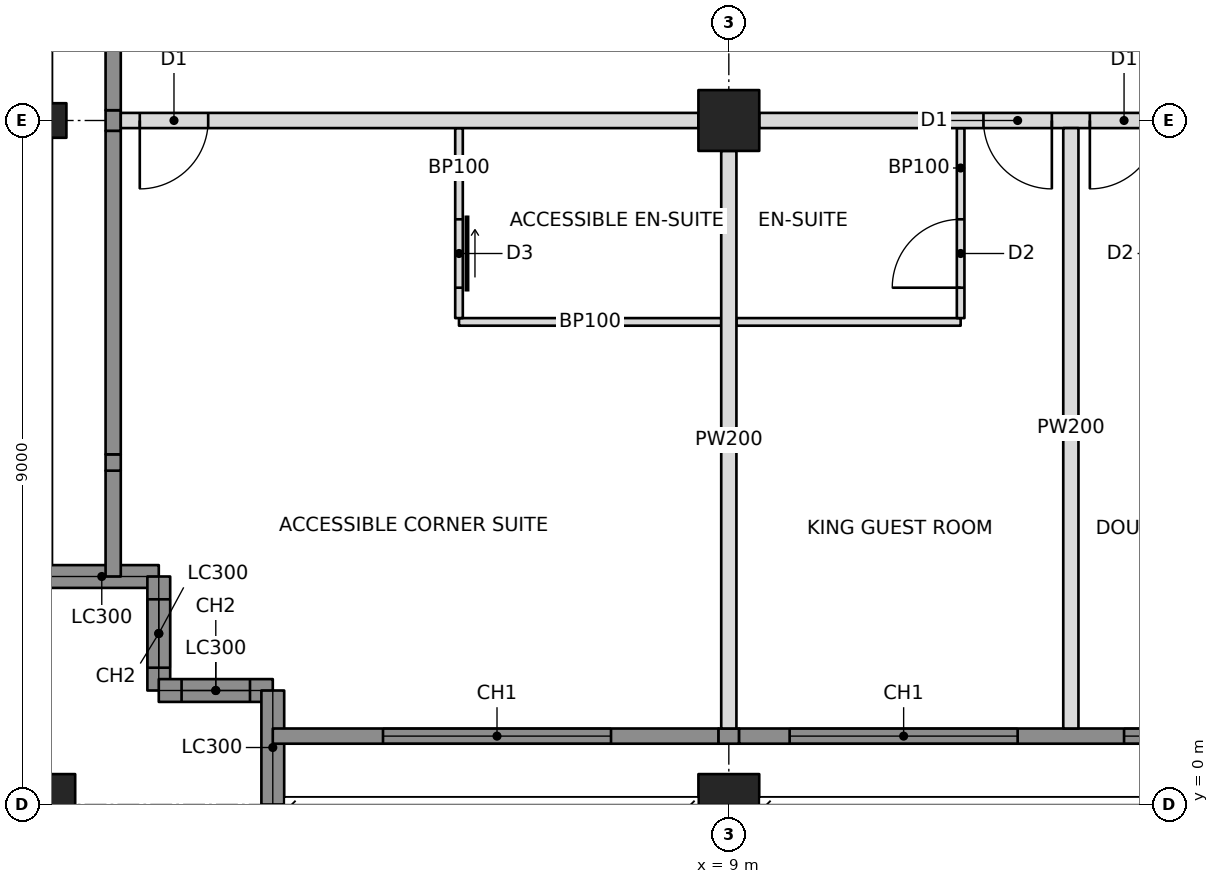
"""IFC4 building model, lengths in metres.
Left out: names, types, materials, properties, quantities, classifications, styles, units other than length and angle.
Written with IfcOpenShell. Run it as: python <this file> out.ifc"""

import sys

from ifc_helpers import new_model, si_unit, direction, frame, frame_2d, origin, origin_with_axes, origin_2d, place, context, subcontext, project, spatial, rectangle, hollow_rectangle, i_section, extrude, element, fill, save


model = new_model("IFC4")
c1 = context("Model", 3, precision=1e-05, world=origin(), true_north=direction((0.0, 1.0)))
c2 = subcontext(c1, "Body", "Model", "MODEL_VIEW")
j1 = project(units=[si_unit("LENGTHUNIT", "METRE"), si_unit("PLANEANGLEUNIT", "RADIAN")], contexts=[c1])
p1 = place(None, origin())
s1 = spatial("IfcSite", under=j1, at=p1, CompositionType="ELEMENT")
p2 = place(p1, origin())
s2 = spatial("IfcBuilding", under=s1, at=p2, CompositionType="ELEMENT")
p3 = place(p2, frame((0.0, 0.0, 82.4)))
s3 = spatial("IfcBuildingStorey", under=s2, at=p3, CompositionType="ELEMENT", Elevation=82.4)
p4 = place(p3, origin_with_axes())
e1 = element("IfcColumn", 1, at=p4, inside=s3, PredefinedType="COLUMN", context=c2, shape_type="SweptSolid", body=[
    extrude(hollow_rectangle(XDim=0.8, YDim=0.8, WallThickness=0.07, at=origin_2d()), origin(), (0.0, 0.0, 1.0), 3.4),
])
p5 = place(p3, frame((0.0, 9.0, 0.0), z_axis=(0.0, 0.0, 1.0), x_axis=(0.0, 1.0, 0.0)))
e2 = element("IfcColumn", 2, at=p5, inside=s3, PredefinedType="COLUMN", context=c2, shape_type="SweptSolid", body=[
    extrude(i_section(OverallWidth=0.455, OverallDepth=0.569, WebThickness=0.078, FlangeThickness=0.125, at=origin_2d()), origin(), (0.0, 0.0, 1.0), 3.4),
])
p6 = place(p3, frame((9.0, 0.0, 0.0), z_axis=(0.0, 0.0, 1.0), x_axis=(1.0, 0.0, 0.0)))
e3 = element("IfcColumn", 3, at=p6, inside=s3, PredefinedType="COLUMN", context=c2, shape_type="SweptSolid", body=[
    extrude(hollow_rectangle(XDim=0.8, YDim=0.8, WallThickness=0.07, at=origin_2d()), origin(), (0.0, 0.0, 1.0), 3.4),
])
p7 = place(p3, frame((9.0, 9.0, 0.0), z_axis=(0.0, 0.0, 1.0), x_axis=(1.0, 0.0, 0.0)))
e4 = element("IfcColumn", 4, at=p7, inside=s3, PredefinedType="COLUMN", context=c2, shape_type="SweptSolid", body=[
    extrude(hollow_rectangle(XDim=0.8, YDim=0.8, WallThickness=0.09, at=origin_2d()), origin(), (0.0, 0.0, 1.0), 3.4),
])
p8 = place(p3, frame((0.0, 3.0, 0.0), z_axis=(0.0, 0.0, 1.0), x_axis=(1.0, 0.0, 0.0)))
e5 = element("IfcWall", 5, at=p8, inside=s3, PredefinedType="SOLIDWALL", context=c2, shape_type="SweptSolid", body=[
    extrude(rectangle(XDim=1.5, YDim=0.3, at=frame_2d((0.75, 0.0))), origin(), (0.0, 0.0, 1.0), 2.42),
])
p9 = place(p3, frame((1.5, 3.0, 0.0), z_axis=(0.0, 0.0, 1.0), x_axis=(0.0, -1.0, 0.0)))
e6 = element("IfcWall", 6, at=p9, inside=s3, PredefinedType="SOLIDWALL", context=c2, shape_type="SweptSolid", body=[
    extrude(rectangle(XDim=1.5, YDim=0.3, at=frame_2d((0.75, 0.0))), origin(), (0.0, 0.0, 1.0), 3.2),
])
p10 = place(p9, frame((0.3, 0.0, 0.6)))
e7 = element("IfcOpeningElement", 7, at=p10, cuts=e6, PredefinedType="OPENING", context=c2, shape_type="SweptSolid", body=[
    extrude(rectangle(XDim=0.9, YDim=2.2, at=frame_2d((0.45, 1.1))), frame((0.0, 0.16, 0.0), z_axis=(0.0, -1.0, 0.0), x_axis=(1.0, 0.0, 0.0)), (0.0, 0.0, 1.0), 0.32),
])
p11 = place(p3, frame((1.5, 1.5, 0.0), z_axis=(0.0, 0.0, 1.0), x_axis=(1.0, 0.0, 0.0)))
e8 = element("IfcWall", 8, at=p11, inside=s3, PredefinedType="SOLIDWALL", context=c2, shape_type="SweptSolid", body=[
    extrude(rectangle(XDim=1.5, YDim=0.3, at=frame_2d((0.75, 0.0))), origin(), (0.0, 0.0, 1.0), 3.2),
])
p12 = place(p11, frame((0.3, 0.0, 0.6)))
e9 = element("IfcOpeningElement", 9, at=p12, cuts=e8, PredefinedType="OPENING", context=c2, shape_type="SweptSolid", body=[
    extrude(rectangle(XDim=0.9, YDim=2.2, at=frame_2d((0.45, 1.1))), frame((0.0, 0.16, 0.0), z_axis=(0.0, -1.0, 0.0), x_axis=(1.0, 0.0, 0.0)), (0.0, 0.0, 1.0), 0.32),
])
p13 = place(p3, frame((3.0, 1.5, 0.0), z_axis=(0.0, 0.0, 1.0), x_axis=(0.0, -1.0, 0.0)))
e10 = element("IfcWall", 10, at=p13, inside=s3, PredefinedType="SOLIDWALL", context=c2, shape_type="SweptSolid", body=[
    extrude(rectangle(XDim=1.5, YDim=0.3, at=frame_2d((0.75, 0.0))), origin(), (0.0, 0.0, 1.0), 2.42),
])
p14 = place(p3, frame((3.0, 0.9, 0.0), z_axis=(0.0, 0.0, 1.0), x_axis=(1.0, 0.0, 0.0)))
e11 = element("IfcWall", 11, at=p14, inside=s3, PredefinedType="SOLIDWALL", context=c2, shape_type="SweptSolid", body=[
    extrude(rectangle(XDim=5.865, YDim=0.2, at=frame_2d((2.932, 0.0))), origin(), (0.0, 0.0, 1.0), 3.2),
])
p15 = place(p14, frame((1.45, 0.0, 0.6)))
e12 = element("IfcOpeningElement", 12, at=p15, cuts=e11, PredefinedType="OPENING", context=c2, shape_type="SweptSolid", body=[
    extrude(rectangle(XDim=3.0, YDim=2.2, at=frame_2d((1.5, 1.1))), frame((0.0, 0.11, 0.0), z_axis=(0.0, -1.0, 0.0), x_axis=(1.0, 0.0, 0.0)), (0.0, 0.0, 1.0), 0.22),
])
p16 = place(p3, frame((0.9, 3.0, 0.0), z_axis=(0.0, 0.0, 1.0), x_axis=(0.0, 1.0, 0.0)))
e13 = element("IfcWall", 13, at=p16, inside=s3, PredefinedType="SOLIDWALL", context=c2, shape_type="SweptSolid", body=[
    extrude(rectangle(XDim=1.393, YDim=0.2, at=frame_2d((0.696, 0.0))), origin(), (0.0, 0.0, 1.0), 3.2),
])
p17 = place(p3, frame((1.0, 9.0, 0.0), z_axis=(0.0, 0.0, 1.0), x_axis=(1.0, 0.0, 0.0)))
e14 = element("IfcWall", 14, at=p17, inside=s3, PredefinedType="PARTITIONING", context=c2, shape_type="SweptSolid", body=[
    extrude(rectangle(XDim=7.6, YDim=0.2, at=frame_2d((3.8, 0.0))), origin(), (0.0, 0.0, 1.0), 2.438),
])
p18 = place(p17, frame((0.25, 0.0, 0.0)))
e15 = element("IfcOpeningElement", 15, at=p18, cuts=e14, PredefinedType="OPENING", context=c2, shape_type="SweptSolid", body=[
    extrude(rectangle(XDim=0.9, YDim=2.1, at=frame_2d((0.45, 1.05))), frame((0.0, 0.11, 0.0), z_axis=(0.0, -1.0, 0.0), x_axis=(1.0, 0.0, 0.0)), (0.0, 0.0, 1.0), 0.22),
])
p19 = place(p3, frame((9.4, 9.0, 0.0), z_axis=(0.0, 0.0, 1.0), x_axis=(1.0, 0.0, 0.0)))
e16 = element("IfcWall", 16, at=p19, inside=s3, PredefinedType="PARTITIONING", context=c2, shape_type="SweptSolid", body=[
    extrude(rectangle(XDim=8.2, YDim=0.2, at=frame_2d((4.1, 0.0))), origin(), (0.0, 0.0, 1.0), 2.405),
])
p20 = place(p19, frame((2.95, 0.0, 0.0)))
e17 = element("IfcOpeningElement", 17, at=p20, cuts=e16, PredefinedType="OPENING", context=c2, shape_type="SweptSolid", body=[
    extrude(rectangle(XDim=0.9, YDim=2.1, at=frame_2d((0.45, 1.05))), frame((0.0, 0.11, 0.0), z_axis=(0.0, -1.0, 0.0), x_axis=(1.0, 0.0, 0.0)), (0.0, 0.0, 1.0), 0.22),
])
p21 = place(p19, frame((4.35, 0.0, 0.0)))
e18 = element("IfcOpeningElement", 18, at=p21, cuts=e16, PredefinedType="OPENING", context=c2, shape_type="SweptSolid", body=[
    extrude(rectangle(XDim=0.9, YDim=2.1, at=frame_2d((0.45, 1.05))), frame((0.0, 0.11, 0.0), z_axis=(0.0, -1.0, 0.0), x_axis=(1.0, 0.0, 0.0)), (0.0, 0.0, 1.0), 0.22),
])
p22 = place(p3, frame((9.0, 8.6, 0.0), z_axis=(0.0, 0.0, 1.0), x_axis=(0.0, -1.0, 0.0)))
e19 = element("IfcWall", 19, at=p22, inside=s3, PredefinedType="PARTITIONING", context=c2, shape_type="SweptSolid", body=[
    extrude(rectangle(XDim=7.6, YDim=0.2, at=frame_2d((3.8, 0.0))), origin(), (0.0, 0.0, 1.0), 2.438),
])
p23 = place(p3, frame((13.5, 8.9, 0.0), z_axis=(0.0, 0.0, 1.0), x_axis=(0.0, -1.0, 0.0)))
e20 = element("IfcWall", 20, at=p23, inside=s3, PredefinedType="PARTITIONING", context=c2, shape_type="SweptSolid", body=[
    extrude(rectangle(XDim=7.9, YDim=0.2, at=frame_2d((3.95, 0.0))), origin(), (0.0, 0.0, 1.0), 2.404),
])
p24 = place(p3, frame((5.45, 6.35, 0.0), z_axis=(0.0, 0.0, 1.0), x_axis=(1.0, 0.0, 0.0)))
e21 = element("IfcWall", 21, at=p24, inside=s3, PredefinedType="PARTITIONING", context=c2, shape_type="SweptSolid", body=[
    extrude(rectangle(XDim=3.45, YDim=0.1, at=frame_2d((1.725, 0.0))), origin(), (0.0, 0.0, 1.0), 2.438),
])
p25 = place(p3, frame((5.45, 8.9, 0.0), z_axis=(0.0, 0.0, 1.0), x_axis=(0.0, -1.0, 0.0)))
e22 = element("IfcWall", 22, at=p25, inside=s3, PredefinedType="PARTITIONING", context=c2, shape_type="SweptSolid", body=[
    extrude(rectangle(XDim=2.5, YDim=0.1, at=frame_2d((1.25, 0.0))), origin(), (0.0, 0.0, 1.0), 2.438),
])
p26 = place(p25, frame((1.2, 0.0, 0.0)))
e23 = element("IfcOpeningElement", 23, at=p26, cuts=e22, PredefinedType="OPENING", context=c2, shape_type="SweptSolid", body=[
    extrude(rectangle(XDim=0.9, YDim=2.1, at=frame_2d((0.45, 1.05))), frame((0.0, 0.06, 0.0), z_axis=(0.0, -1.0, 0.0), x_axis=(1.0, 0.0, 0.0)), (0.0, 0.0, 1.0), 0.12),
])
p27 = place(p3, frame((9.1, 6.35, 0.0), z_axis=(0.0, 0.0, 1.0), x_axis=(1.0, 0.0, 0.0)))
e24 = element("IfcWall", 24, at=p27, inside=s3, PredefinedType="PARTITIONING", context=c2, shape_type="SweptSolid", body=[
    extrude(rectangle(XDim=2.95, YDim=0.1, at=frame_2d((1.475, 0.0))), origin(), (0.0, 0.0, 1.0), 2.438),
])
p28 = place(p3, frame((12.05, 8.9, 0.0), z_axis=(0.0, 0.0, 1.0), x_axis=(0.0, -1.0, 0.0)))
e25 = element("IfcWall", 25, at=p28, inside=s3, PredefinedType="PARTITIONING", context=c2, shape_type="SweptSolid", body=[
    extrude(rectangle(XDim=2.5, YDim=0.1, at=frame_2d((1.25, 0.0))), origin(), (0.0, 0.0, 1.0), 2.404),
])
p29 = place(p28, frame((1.2, 0.0, 0.0)))
e26 = element("IfcOpeningElement", 26, at=p29, cuts=e25, PredefinedType="OPENING", context=c2, shape_type="SweptSolid", body=[
    extrude(rectangle(XDim=0.9, YDim=2.1, at=frame_2d((0.45, 1.05))), frame((0.0, 0.06, 0.0), z_axis=(0.0, -1.0, 0.0), x_axis=(1.0, 0.0, 0.0)), (0.0, 0.0, 1.0), 0.12),
])
p30 = place(p3, frame((8.865, 0.9, 0.0), z_axis=(0.0, 0.0, 1.0), x_axis=(1.0, 0.0, 0.0)))
e27 = element("IfcWall", 27, at=p30, inside=s3, PredefinedType="SOLIDWALL", context=c2, shape_type="SweptSolid", body=[
    extrude(rectangle(XDim=0.271, YDim=0.2, at=frame_2d((0.135, 0.0))), origin(), (0.0, 0.0, 1.0), 2.438),
])
p31 = place(p3, frame((9.135, 0.9, 0.0), z_axis=(0.0, 0.0, 1.0), x_axis=(1.0, 0.0, 0.0)))
e28 = element("IfcWall", 28, at=p31, inside=s3, PredefinedType="SOLIDWALL", context=c2, shape_type="SweptSolid", body=[
    extrude(rectangle(XDim=8.671, YDim=0.2, at=frame_2d((4.335, 0.0))), origin(), (0.0, 0.0, 1.0), 3.2),
])
p32 = place(p31, frame((0.665, 0.0, 0.6)))
e29 = element("IfcOpeningElement", 29, at=p32, cuts=e28, PredefinedType="OPENING", context=c2, shape_type="SweptSolid", body=[
    extrude(rectangle(XDim=3.0, YDim=2.2, at=frame_2d((1.5, 1.1))), frame((0.0, 0.11, 0.0), z_axis=(0.0, -1.0, 0.0), x_axis=(1.0, 0.0, 0.0)), (0.0, 0.0, 1.0), 0.22),
])
p33 = place(p31, frame((5.065, 0.0, 0.6)))
e30 = element("IfcOpeningElement", 30, at=p33, cuts=e28, PredefinedType="OPENING", context=c2, shape_type="SweptSolid", body=[
    extrude(rectangle(XDim=3.0, YDim=2.2, at=frame_2d((1.5, 1.1))), frame((0.0, 0.11, 0.0), z_axis=(0.0, -1.0, 0.0), x_axis=(1.0, 0.0, 0.0)), (0.0, 0.0, 1.0), 0.22),
])
p34 = place(p3, frame((0.9, 4.393, 0.0), z_axis=(0.0, 0.0, 1.0), x_axis=(0.0, 1.0, 0.0)))
e31 = element("IfcWall", 31, at=p34, inside=s3, PredefinedType="SOLIDWALL", context=c2, shape_type="SweptSolid", body=[
    extrude(rectangle(XDim=0.215, YDim=0.2, at=frame_2d((0.107, 0.0))), origin(), (0.0, 0.0, 1.0), 2.661),
])
p35 = place(p3, frame((0.9, 4.607, 0.0), z_axis=(0.0, 0.0, 1.0), x_axis=(0.0, 1.0, 0.0)))
e32 = element("IfcWall", 32, at=p35, inside=s3, PredefinedType="SOLIDWALL", context=c2, shape_type="SweptSolid", body=[
    extrude(rectangle(XDim=4.257, YDim=0.2, at=frame_2d((2.129, 0.0))), origin(), (0.0, 0.0, 1.0), 3.2),
])
p36 = place(p3, frame((0.9, 8.865, 0.0), z_axis=(0.0, 0.0, 1.0), x_axis=(0.0, 1.0, 0.0)))
e33 = element("IfcWall", 33, at=p36, inside=s3, PredefinedType="SOLIDWALL", context=c2, shape_type="SweptSolid", body=[
    extrude(rectangle(XDim=0.271, YDim=0.2, at=frame_2d((0.135, 0.0))), origin(), (0.0, 0.0, 1.0), 2.438),
])
p37 = place(p3, frame((0.9, 9.135, 0.0), z_axis=(0.0, 0.0, 1.0), x_axis=(0.0, 1.0, 0.0)))
e34 = element("IfcWall", 34, at=p37, inside=s3, PredefinedType="SOLIDWALL", context=c2, shape_type="SweptSolid", body=[
    extrude(rectangle(XDim=8.671, YDim=0.2, at=frame_2d((4.335, 0.0))), origin(), (0.0, 0.0, 1.0), 3.2),
])
p38 = place(p37, frame((2.015, 0.0, 0.6)))
e35 = element("IfcOpeningElement", 35, at=p38, cuts=e34, PredefinedType="OPENING", context=c2, shape_type="SweptSolid", body=[
    extrude(rectangle(XDim=3.0, YDim=2.2, at=frame_2d((1.5, 1.1))), frame((0.0, 0.11, 0.0), z_axis=(0.0, -1.0, 0.0), x_axis=(1.0, 0.0, 0.0)), (0.0, 0.0, 1.0), 0.22),
])
p39 = place(p37, frame((5.515, 0.0, 0.6)))
e36 = element("IfcOpeningElement", 36, at=p39, cuts=e34, PredefinedType="OPENING", context=c2, shape_type="SweptSolid", body=[
    extrude(rectangle(XDim=3.0, YDim=2.2, at=frame_2d((1.5, 1.1))), frame((0.0, 0.11, 0.0), z_axis=(0.0, -1.0, 0.0), x_axis=(1.0, 0.0, 0.0)), (0.0, 0.0, 1.0), 0.22),
])
p40 = place(p10, origin())
e37 = element("IfcWindow", 37, at=p40, inside=s3, PartitioningType="SINGLE_PANEL", PredefinedType="WINDOW", context=c2, shape_type="SweptSolid", body=[
    extrude(rectangle(XDim=0.9, YDim=2.2, at=frame_2d((0.45, 1.1))), frame((0.0, 0.03, 0.0), z_axis=(0.0, -1.0, 0.0), x_axis=(1.0, 0.0, 0.0)), (0.0, 0.0, 1.0), 0.06),
])
fill(e7, e37)
p41 = place(p12, origin())
e38 = element("IfcWindow", 38, at=p41, inside=s3, PartitioningType="SINGLE_PANEL", PredefinedType="WINDOW", context=c2, shape_type="SweptSolid", body=[
    extrude(rectangle(XDim=0.9, YDim=2.2, at=frame_2d((0.45, 1.1))), frame((0.0, 0.03, 0.0), z_axis=(0.0, -1.0, 0.0), x_axis=(1.0, 0.0, 0.0)), (0.0, 0.0, 1.0), 0.06),
])
fill(e9, e38)
p42 = place(p15, origin())
e39 = element("IfcWindow", 39, at=p42, inside=s3, PartitioningType="TRIPLE_PANEL_VERTICAL", PredefinedType="WINDOW", context=c2, shape_type="SweptSolid", body=[
    extrude(rectangle(XDim=3.0, YDim=2.2, at=frame_2d((1.5, 1.1))), frame((0.0, 0.03, 0.0), z_axis=(0.0, -1.0, 0.0), x_axis=(1.0, 0.0, 0.0)), (0.0, 0.0, 1.0), 0.06),
])
fill(e12, e39)
p43 = place(p32, origin())
e40 = element("IfcWindow", 40, at=p43, inside=s3, PartitioningType="TRIPLE_PANEL_VERTICAL", PredefinedType="WINDOW", context=c2, shape_type="SweptSolid", body=[
    extrude(rectangle(XDim=3.0, YDim=2.2, at=frame_2d((1.5, 1.1))), frame((0.0, 0.03, 0.0), z_axis=(0.0, -1.0, 0.0), x_axis=(1.0, 0.0, 0.0)), (0.0, 0.0, 1.0), 0.06),
])
fill(e29, e40)
p44 = place(p33, origin())
e41 = element("IfcWindow", 41, at=p44, inside=s3, PartitioningType="TRIPLE_PANEL_VERTICAL", PredefinedType="WINDOW", context=c2, shape_type="SweptSolid", body=[
    extrude(rectangle(XDim=3.0, YDim=2.2, at=frame_2d((1.5, 1.1))), frame((0.0, 0.03, 0.0), z_axis=(0.0, -1.0, 0.0), x_axis=(1.0, 0.0, 0.0)), (0.0, 0.0, 1.0), 0.06),
])
fill(e30, e41)
p45 = place(p26, origin())
e42 = element("IfcDoor", 42, at=p45, inside=s3, OperationType="SLIDING_TO_LEFT", PredefinedType="DOOR", context=c2, shape_type="SweptSolid", body=[
    extrude(rectangle(XDim=0.9, YDim=2.1, at=frame_2d((0.45, 1.05))), frame((0.0, 0.025, 0.0), z_axis=(0.0, -1.0, 0.0), x_axis=(1.0, 0.0, 0.0)), (0.0, 0.0, 1.0), 0.05),
])
fill(e23, e42)
p46 = place(p18, frame((0.9, 0.0, 0.0), z_axis=(0.0, 0.0, 1.0), x_axis=(-1.0, 0.0, 0.0)))
e43 = element("IfcDoor", 43, at=p46, inside=s3, OperationType="SINGLE_SWING_RIGHT", PredefinedType="DOOR", context=c2, shape_type="SweptSolid", body=[
    extrude(rectangle(XDim=0.9, YDim=2.1, at=frame_2d((0.45, 1.05))), frame((0.0, 0.025, 0.0), z_axis=(0.0, -1.0, 0.0), x_axis=(1.0, 0.0, 0.0)), (0.0, 0.0, 1.0), 0.05),
])
fill(e15, e43)
p47 = place(p29, frame((0.9, 0.0, 0.0), z_axis=(0.0, 0.0, 1.0), x_axis=(-1.0, 0.0, 0.0)))
e44 = element("IfcDoor", 44, at=p47, inside=s3, OperationType="SINGLE_SWING_LEFT", PredefinedType="DOOR", context=c2, shape_type="SweptSolid", body=[
    extrude(rectangle(XDim=0.9, YDim=2.1, at=frame_2d((0.45, 1.05))), frame((0.0, 0.025, 0.0), z_axis=(0.0, -1.0, 0.0), x_axis=(1.0, 0.0, 0.0)), (0.0, 0.0, 1.0), 0.05),
])
fill(e26, e44)
p48 = place(p20, frame((0.9, 0.0, 0.0), z_axis=(0.0, 0.0, 1.0), x_axis=(-1.0, 0.0, 0.0)))
e45 = element("IfcDoor", 45, at=p48, inside=s3, OperationType="SINGLE_SWING_LEFT", PredefinedType="DOOR", context=c2, shape_type="SweptSolid", body=[
    extrude(rectangle(XDim=0.9, YDim=2.1, at=frame_2d((0.45, 1.05))), frame((0.0, 0.025, 0.0), z_axis=(0.0, -1.0, 0.0), x_axis=(1.0, 0.0, 0.0)), (0.0, 0.0, 1.0), 0.05),
])
fill(e17, e45)
p49 = place(p21, frame((0.9, 0.0, 0.0), z_axis=(0.0, 0.0, 1.0), x_axis=(-1.0, 0.0, 0.0)))
e46 = element("IfcDoor", 46, at=p49, inside=s3, OperationType="SINGLE_SWING_RIGHT", PredefinedType="DOOR", context=c2, shape_type="SweptSolid", body=[
    extrude(rectangle(XDim=0.9, YDim=2.1, at=frame_2d((0.45, 1.05))), frame((0.0, 0.025, 0.0), z_axis=(0.0, -1.0, 0.0), x_axis=(1.0, 0.0, 0.0)), (0.0, 0.0, 1.0), 0.05),
])
fill(e18, e46)
save(model, sys.argv[1])
